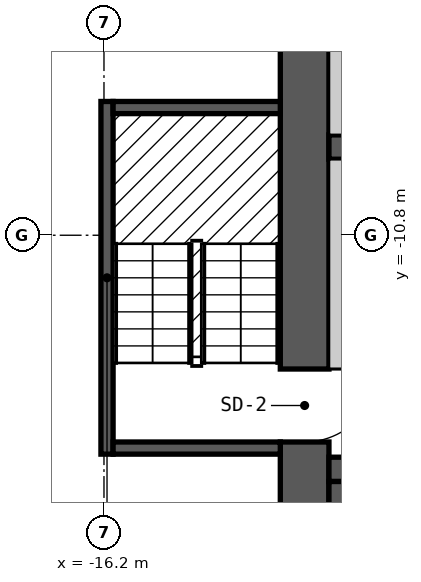
"""IFC4 building model, lengths in metres.
Left out: names, types, materials, properties, quantities, classifications, styles, units other than length and angle.
Written with IfcOpenShell. Run it as: python <this file> out.ifc"""

import sys

from ifc_helpers import new_model, si_unit, direction, frame, frame_2d, origin, place, context, subcontext, project, spatial, polyline, rectangle, outline, extrude, element, fill, save


model = new_model("IFC4")
c1 = context("Model", 3, precision=1e-05, world=origin(), true_north=direction((0.0, 1.0)))
c2 = subcontext(c1, "Body", "Model", "MODEL_VIEW")
j1 = project(units=[si_unit("LENGTHUNIT", "METRE"), si_unit("PLANEANGLEUNIT", "RADIAN")], contexts=[c1])
p1 = place(None, origin())
s1 = spatial("IfcSite", under=j1, at=p1, CompositionType="ELEMENT")
p2 = place(p1, origin())
s2 = spatial("IfcBuilding", under=s1, at=p2, CompositionType="ELEMENT")
p3 = place(p2, frame((0.0, 0.0, 126.6)))
s3 = spatial("IfcBuildingStorey", under=s2, at=p3, CompositionType="ELEMENT", Elevation=126.6)
p4 = place(p3, frame((-12.9, -18.2, 0.0), z_axis=(0.0, 0.0, 1.0), x_axis=(0.0, 1.0, 0.0)))
e1 = element("IfcWall", 1, at=p4, inside=s3, PredefinedType="SHEAR", context=c2, shape_type="SweptSolid", body=[
    extrude(rectangle(XDim=12.4, YDim=0.8, at=frame_2d((6.2, 0.0))), origin(), (0.0, 0.0, 1.0), 2.7),
])
p5 = place(p4, frame((4.0, 0.0, 0.0)))
e2 = element("IfcOpeningElement", 2, at=p5, cuts=e1, PredefinedType="OPENING", context=c2, shape_type="SweptSolid", body=[
    extrude(rectangle(XDim=1.2, YDim=2.1, at=frame_2d((0.6, 1.05))), frame((0.0, 0.41, 0.0), z_axis=(0.0, -1.0, 0.0), x_axis=(1.0, 0.0, 0.0)), (0.0, 0.0, 1.0), 0.82),
])
p6 = place(p3, frame((-12.5, -14.65, 0.0), z_axis=(0.0, 0.0, 1.0), x_axis=(1.0, 0.0, 0.0)))
e3 = element("IfcWall", 3, at=p6, inside=s3, PredefinedType="SHEAR", context=c2, shape_type="SweptSolid", body=[
    extrude(rectangle(XDim=25.0, YDim=0.4, at=frame_2d((12.5, 0.0))), origin(), (0.0, 0.0, 1.0), 2.7),
])
p7 = place(p6, frame((1.7, 0.0, 0.0), z_axis=(0.0, 0.0, 1.0), x_axis=(-1.0, 0.0, 0.0)))
e4 = element("IfcOpeningElement", 4, at=p7, cuts=e3, PredefinedType="OPENING", context=c2, shape_type="SweptSolid", body=[
    extrude(rectangle(XDim=1.2, YDim=2.1, at=frame_2d((0.6, 1.05))), frame((0.0, 0.21, 0.0), z_axis=(0.0, -1.0, 0.0), x_axis=(1.0, 0.0, 0.0)), (0.0, 0.0, 1.0), 0.42),
])
p8 = place(p6, frame((24.55, 0.0, 0.0), z_axis=(0.0, 0.0, 1.0), x_axis=(-1.0, 0.0, 0.0)))
e5 = element("IfcOpeningElement", 5, at=p8, cuts=e3, PredefinedType="OPENING", context=c2, shape_type="SweptSolid", body=[
    extrude(rectangle(XDim=1.2, YDim=2.1, at=frame_2d((0.6, 1.05))), frame((0.0, 0.21, 0.0), z_axis=(0.0, -1.0, 0.0), x_axis=(1.0, 0.0, 0.0)), (0.0, 0.0, 1.0), 0.42),
])
p9 = place(p6, frame((8.4, 0.0, 0.0), z_axis=(0.0, 0.0, 1.0), x_axis=(-1.0, 0.0, 0.0)))
e6 = element("IfcOpeningElement", 6, at=p9, cuts=e3, PredefinedType="OPENING", context=c2, shape_type="SweptSolid", body=[
    extrude(rectangle(XDim=1.0, YDim=2.1, at=frame_2d((0.5, 1.05))), frame((0.0, 0.21, 0.0), z_axis=(0.0, -1.0, 0.0), x_axis=(1.0, 0.0, 0.0)), (0.0, 0.0, 1.0), 0.42),
])
p10 = place(p6, frame((11.15, 0.0, 0.0), z_axis=(0.0, 0.0, 1.0), x_axis=(-1.0, 0.0, 0.0)))
e7 = element("IfcOpeningElement", 7, at=p10, cuts=e3, PredefinedType="OPENING", context=c2, shape_type="SweptSolid", body=[
    extrude(rectangle(XDim=0.9, YDim=2.1, at=frame_2d((0.45, 1.05))), frame((0.0, 0.21, 0.0), z_axis=(0.0, -1.0, 0.0), x_axis=(1.0, 0.0, 0.0)), (0.0, 0.0, 1.0), 0.42),
])
p11 = place(p6, frame((13.95, 0.0, 0.0), z_axis=(0.0, 0.0, 1.0), x_axis=(-1.0, 0.0, 0.0)))
e8 = element("IfcOpeningElement", 8, at=p11, cuts=e3, PredefinedType="OPENING", context=c2, shape_type="SweptSolid", body=[
    extrude(rectangle(XDim=1.0, YDim=2.1, at=frame_2d((0.5, 1.05))), frame((0.0, 0.21, 0.0), z_axis=(0.0, -1.0, 0.0), x_axis=(1.0, 0.0, 0.0)), (0.0, 0.0, 1.0), 0.42),
])
p12 = place(p6, frame((17.55, 0.0, 0.0), z_axis=(0.0, 0.0, 1.0), x_axis=(-1.0, 0.0, 0.0)))
e9 = element("IfcOpeningElement", 9, at=p12, cuts=e3, PredefinedType="OPENING", context=c2, shape_type="SweptSolid", body=[
    extrude(rectangle(XDim=1.0, YDim=2.1, at=frame_2d((0.5, 1.05))), frame((0.0, 0.21, 0.0), z_axis=(0.0, -1.0, 0.0), x_axis=(1.0, 0.0, 0.0)), (0.0, 0.0, 1.0), 0.42),
])
p13 = place(p3, frame((-12.5, -9.35, 0.0), z_axis=(0.0, 0.0, 1.0), x_axis=(1.0, 0.0, 0.0)))
e10 = element("IfcWall", 10, at=p13, inside=s3, PredefinedType="SHEAR", context=c2, shape_type="SweptSolid", body=[
    extrude(rectangle(XDim=22.7, YDim=0.4, at=frame_2d((11.35, 0.0))), origin(), (0.0, 0.0, 1.0), 2.7),
])
p14 = place(p13, frame((1.1, 0.0, 0.0)))
e11 = element("IfcOpeningElement", 11, at=p14, cuts=e10, PredefinedType="OPENING", context=c2, shape_type="SweptSolid", body=[
    extrude(rectangle(XDim=1.1, YDim=2.1, at=frame_2d((0.55, 1.05))), frame((0.0, 0.21, 0.0), z_axis=(0.0, -1.0, 0.0), x_axis=(1.0, 0.0, 0.0)), (0.0, 0.0, 1.0), 0.42),
])
p15 = place(p13, frame((3.9, 0.0, 0.0)))
e12 = element("IfcOpeningElement", 12, at=p15, cuts=e10, PredefinedType="OPENING", context=c2, shape_type="SweptSolid", body=[
    extrude(rectangle(XDim=1.1, YDim=2.1, at=frame_2d((0.55, 1.05))), frame((0.0, 0.21, 0.0), z_axis=(0.0, -1.0, 0.0), x_axis=(1.0, 0.0, 0.0)), (0.0, 0.0, 1.0), 0.42),
])
p16 = place(p13, frame((6.7, 0.0, 0.0)))
e13 = element("IfcOpeningElement", 13, at=p16, cuts=e10, PredefinedType="OPENING", context=c2, shape_type="SweptSolid", body=[
    extrude(rectangle(XDim=1.1, YDim=2.1, at=frame_2d((0.55, 1.05))), frame((0.0, 0.21, 0.0), z_axis=(0.0, -1.0, 0.0), x_axis=(1.0, 0.0, 0.0)), (0.0, 0.0, 1.0), 0.42),
])
p17 = place(p13, frame((9.0, 0.0, 0.0)))
e14 = element("IfcOpeningElement", 14, at=p17, cuts=e10, PredefinedType="OPENING", context=c2, shape_type="SweptSolid", body=[
    extrude(rectangle(XDim=1.1, YDim=2.1, at=frame_2d((0.55, 1.05))), frame((0.0, 0.21, 0.0), z_axis=(0.0, -1.0, 0.0), x_axis=(1.0, 0.0, 0.0)), (0.0, 0.0, 1.0), 0.42),
])
p18 = place(p13, frame((11.3, 0.0, 0.0)))
e15 = element("IfcOpeningElement", 15, at=p18, cuts=e10, PredefinedType="OPENING", context=c2, shape_type="SweptSolid", body=[
    extrude(rectangle(XDim=1.1, YDim=2.1, at=frame_2d((0.55, 1.05))), frame((0.0, 0.21, 0.0), z_axis=(0.0, -1.0, 0.0), x_axis=(1.0, 0.0, 0.0)), (0.0, 0.0, 1.0), 0.42),
])
p19 = place(p13, frame((13.6, 0.0, 0.0)))
e16 = element("IfcOpeningElement", 16, at=p19, cuts=e10, PredefinedType="OPENING", context=c2, shape_type="SweptSolid", body=[
    extrude(rectangle(XDim=1.1, YDim=2.1, at=frame_2d((0.55, 1.05))), frame((0.0, 0.21, 0.0), z_axis=(0.0, -1.0, 0.0), x_axis=(1.0, 0.0, 0.0)), (0.0, 0.0, 1.0), 0.42),
])
p20 = place(p13, frame((15.9, 0.0, 0.0)))
e17 = element("IfcOpeningElement", 17, at=p20, cuts=e10, PredefinedType="OPENING", context=c2, shape_type="SweptSolid", body=[
    extrude(rectangle(XDim=1.1, YDim=2.1, at=frame_2d((0.55, 1.05))), frame((0.0, 0.21, 0.0), z_axis=(0.0, -1.0, 0.0), x_axis=(1.0, 0.0, 0.0)), (0.0, 0.0, 1.0), 0.42),
])
p21 = place(p13, frame((18.2, 0.0, 0.0)))
e18 = element("IfcOpeningElement", 18, at=p21, cuts=e10, PredefinedType="OPENING", context=c2, shape_type="SweptSolid", body=[
    extrude(rectangle(XDim=1.1, YDim=2.1, at=frame_2d((0.55, 1.05))), frame((0.0, 0.21, 0.0), z_axis=(0.0, -1.0, 0.0), x_axis=(1.0, 0.0, 0.0)), (0.0, 0.0, 1.0), 0.42),
])
p22 = place(p13, frame((20.6, 0.0, 0.0)))
e19 = element("IfcOpeningElement", 19, at=p22, cuts=e10, PredefinedType="OPENING", context=c2, shape_type="SweptSolid", body=[
    extrude(rectangle(XDim=1.1, YDim=2.1, at=frame_2d((0.55, 1.05))), frame((0.0, 0.21, 0.0), z_axis=(0.0, -1.0, 0.0), x_axis=(1.0, 0.0, 0.0)), (0.0, 0.0, 1.0), 0.42),
])
p23 = place(p3, frame((-28.218, -2.025, 0.0), z_axis=(0.0, 0.0, 1.0), x_axis=(0.500017503135, -0.866015298109, 0.0)))
e20 = element("IfcWall", 20, at=p23, inside=s3, PredefinedType="SOLIDWALL", context=c2, shape_type="SweptSolid", body=[
    extrude(outline(polyline([(0.0, -0.15), (24.711, -0.15), (24.631, 0.15), (0.08, 0.15), (0.0, -0.15)])), origin(), (0.0, 0.0, 1.0), 2.7),
])
p24 = place(p23, frame((1.4, 0.0, 0.15)))
e21 = element("IfcOpeningElement", 21, at=p24, cuts=e20, PredefinedType="OPENING", context=c2, shape_type="SweptSolid", body=[
    extrude(rectangle(XDim=1.5, YDim=2.1, at=frame_2d((0.75, 1.05))), frame((0.0, 0.16, 0.0), z_axis=(0.0, -1.0, 0.0), x_axis=(1.0, 0.0, 0.0)), (0.0, 0.0, 1.0), 0.32),
])
p25 = place(p23, frame((4.316, 0.0, 0.15)))
e22 = element("IfcOpeningElement", 22, at=p25, cuts=e20, PredefinedType="OPENING", context=c2, shape_type="SweptSolid", body=[
    extrude(rectangle(XDim=1.5, YDim=2.1, at=frame_2d((0.75, 1.05))), frame((0.0, 0.16, 0.0), z_axis=(0.0, -1.0, 0.0), x_axis=(1.0, 0.0, 0.0)), (0.0, 0.0, 1.0), 0.32),
])
p26 = place(p23, frame((7.231, 0.0, 0.15)))
e23 = element("IfcOpeningElement", 23, at=p26, cuts=e20, PredefinedType="OPENING", context=c2, shape_type="SweptSolid", body=[
    extrude(rectangle(XDim=1.5, YDim=2.1, at=frame_2d((0.75, 1.05))), frame((0.0, 0.16, 0.0), z_axis=(0.0, -1.0, 0.0), x_axis=(1.0, 0.0, 0.0)), (0.0, 0.0, 1.0), 0.32),
])
p27 = place(p23, frame((10.147, 0.0, 0.15)))
e24 = element("IfcOpeningElement", 24, at=p27, cuts=e20, PredefinedType="OPENING", context=c2, shape_type="SweptSolid", body=[
    extrude(rectangle(XDim=1.5, YDim=2.1, at=frame_2d((0.75, 1.05))), frame((0.0, 0.16, 0.0), z_axis=(0.0, -1.0, 0.0), x_axis=(1.0, 0.0, 0.0)), (0.0, 0.0, 1.0), 0.32),
])
p28 = place(p23, frame((13.062, 0.0, 0.15)))
e25 = element("IfcOpeningElement", 25, at=p28, cuts=e20, PredefinedType="OPENING", context=c2, shape_type="SweptSolid", body=[
    extrude(rectangle(XDim=1.5, YDim=2.1, at=frame_2d((0.75, 1.05))), frame((0.0, 0.16, 0.0), z_axis=(0.0, -1.0, 0.0), x_axis=(1.0, 0.0, 0.0)), (0.0, 0.0, 1.0), 0.32),
])
p29 = place(p23, frame((15.977, 0.0, 0.15)))
e26 = element("IfcOpeningElement", 26, at=p29, cuts=e20, PredefinedType="OPENING", context=c2, shape_type="SweptSolid", body=[
    extrude(rectangle(XDim=1.5, YDim=2.1, at=frame_2d((0.75, 1.05))), frame((0.0, 0.16, 0.0), z_axis=(0.0, -1.0, 0.0), x_axis=(1.0, 0.0, 0.0)), (0.0, 0.0, 1.0), 0.32),
])
p30 = place(p23, frame((18.893, 0.0, 0.15)))
e27 = element("IfcOpeningElement", 27, at=p30, cuts=e20, PredefinedType="OPENING", context=c2, shape_type="SweptSolid", body=[
    extrude(rectangle(XDim=1.5, YDim=2.1, at=frame_2d((0.75, 1.05))), frame((0.0, 0.16, 0.0), z_axis=(0.0, -1.0, 0.0), x_axis=(1.0, 0.0, 0.0)), (0.0, 0.0, 1.0), 0.32),
])
p31 = place(p23, frame((21.809, 0.0, 0.15)))
e28 = element("IfcOpeningElement", 28, at=p31, cuts=e20, PredefinedType="OPENING", context=c2, shape_type="SweptSolid", body=[
    extrude(rectangle(XDim=1.5, YDim=2.1, at=frame_2d((0.75, 1.05))), frame((0.0, 0.16, 0.0), z_axis=(0.0, -1.0, 0.0), x_axis=(1.0, 0.0, 0.0)), (0.0, 0.0, 1.0), 0.32),
])
p32 = place(p3, frame((-16.15, -14.4, 0.0), z_axis=(0.0, 0.0, 1.0), x_axis=(0.0, 1.0, 0.0)))
e29 = element("IfcWall", 29, at=p32, inside=s3, PredefinedType="SOLIDWALL", context=c2, shape_type="SweptSolid", body=[
    extrude(rectangle(XDim=5.8, YDim=0.2, at=frame_2d((2.9, 0.0))), origin(), (0.0, 0.0, 1.0), 2.7),
])
for number, where, z_axis, x_axis in (
    (30, (-16.05, -14.3, 0.0), (0.0, 0.0, 1.0), (1.0, 0.0, 0.0)),
    (31, (-16.05, -8.7, 0.0), (0.0, 0.0, 1.0), (1.0, 0.0, 0.0)),
):
    element("IfcWall", number, at=place(p3, frame(where, z_axis=z_axis, x_axis=x_axis)), inside=s3, PredefinedType="SOLIDWALL", context=c2, shape_type="SweptSolid", body=[
        extrude(rectangle(XDim=2.75, YDim=0.2, at=frame_2d((1.375, 0.0))), origin(), (0.0, 0.0, 1.0), 2.7),
    ])
p33 = place(p3, frame((-12.3, -18.2, 0.0), z_axis=(0.0, 0.0, 1.0), x_axis=(0.0, 1.0, 0.0)))
e32 = element("IfcWall", 32, at=p33, inside=s3, PredefinedType="SOLIDWALL", context=c2, shape_type="SweptSolid", body=[
    extrude(rectangle(XDim=3.35, YDim=0.4, at=frame_2d((1.675, 0.0))), origin(), (0.0, 0.0, 1.0), 2.7),
])
p34 = place(p3, frame((-12.3, -13.0, 0.0), z_axis=(0.0, 0.0, 1.0), x_axis=(0.0, 1.0, 0.0)))
e33 = element("IfcWall", 33, at=p34, inside=s3, PredefinedType="PARTITIONING", context=c2, shape_type="SweptSolid", body=[
    extrude(rectangle(XDim=3.45, YDim=0.4, at=frame_2d((1.725, 0.0))), origin(), (0.0, 0.0, 1.0), 2.7),
])
p35 = place(p3, frame((-12.3, -9.15, 0.0), z_axis=(0.0, 0.0, 1.0), x_axis=(0.0, 1.0, 0.0)))
e34 = element("IfcWall", 34, at=p35, inside=s3, PredefinedType="SOLIDWALL", context=c2, shape_type="SweptSolid", body=[
    extrude(rectangle(XDim=3.35, YDim=0.4, at=frame_2d((1.675, 0.0))), origin(), (0.0, 0.0, 1.0), 2.7),
])
p36 = place(p5, origin())
e35 = element("IfcDoor", 35, at=p36, inside=s3, OperationType="SINGLE_SWING_RIGHT", PredefinedType="DOOR", context=c2, shape_type="SweptSolid", body=[
    extrude(rectangle(XDim=1.2, YDim=2.1, at=frame_2d((0.6, 1.05))), frame((0.0, 0.025, 0.0), z_axis=(0.0, -1.0, 0.0), x_axis=(1.0, 0.0, 0.0)), (0.0, 0.0, 1.0), 0.05),
])
fill(e2, e35)
save(model, sys.argv[1])
